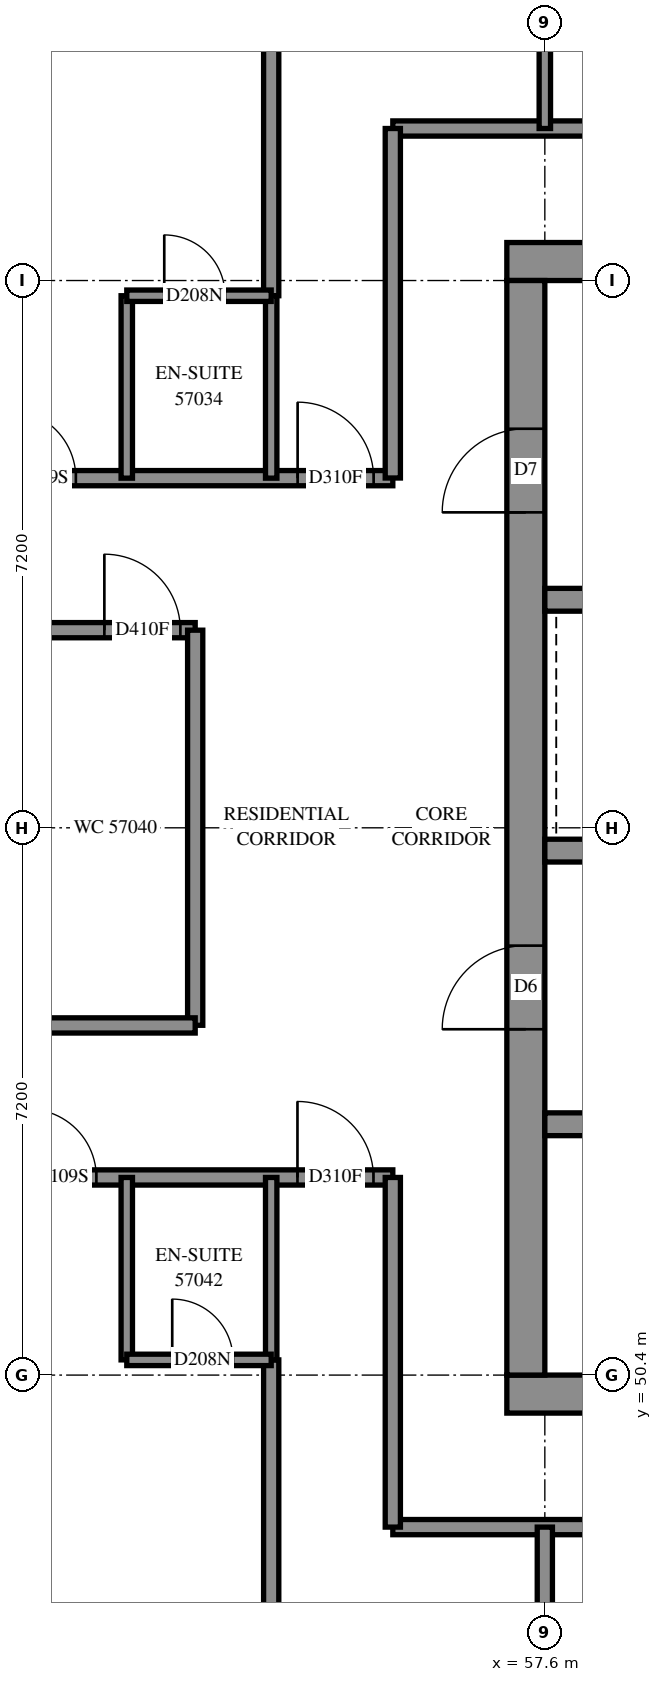
"""IFC4 building model, lengths in metres.
Left out: names, types, materials, properties, quantities, classifications, styles, units other than length and angle.
Written with IfcOpenShell. Run it as: python <this file> out.ifc"""

import sys

from ifc_helpers import new_model, si_unit, direction, frame, frame_2d, origin, place, context, subcontext, project, spatial, rectangle, extrude, element, fill, save


model = new_model("IFC4")
c1 = context("Model", 3, precision=1e-05, world=origin(), true_north=direction((0.0, 1.0)))
c2 = subcontext(c1, "Body", "Model", "MODEL_VIEW")
j1 = project(units=[si_unit("LENGTHUNIT", "METRE"), si_unit("PLANEANGLEUNIT", "RADIAN")], contexts=[c1])
p1 = place(None, origin())
s1 = spatial("IfcSite", under=j1, at=p1, CompositionType="ELEMENT")
p2 = place(p1, origin())
s2 = spatial("IfcBuilding", under=s1, at=p2, CompositionType="ELEMENT")
p3 = place(p2, frame((0.0, 0.0, 210.0)))
s3 = spatial("IfcBuildingStorey", under=s2, at=p3, CompositionType="ELEMENT", Elevation=210.0)
p4 = place(p3, frame((57.1, 50.15, -0.3), z_axis=(0.0, 0.0, 1.0), x_axis=(1.0, 0.0, 0.0)))
e1 = element("IfcWall", 1, at=p4, inside=s3, PredefinedType="SHEAR", context=c2, shape_type="SweptSolid", body=[
    extrude(rectangle(XDim=15.4, YDim=0.5, at=frame_2d((7.7, 0.0))), origin(), (0.0, 0.0, 1.0), 2.7),
])
p5 = place(p3, frame((57.1, 65.05, -0.3), z_axis=(0.0, 0.0, 1.0), x_axis=(1.0, 0.0, 0.0)))
e2 = element("IfcWall", 2, at=p5, inside=s3, PredefinedType="SHEAR", context=c2, shape_type="SweptSolid", body=[
    extrude(rectangle(XDim=15.4, YDim=0.5, at=frame_2d((7.7, 0.0))), origin(), (0.0, 0.0, 1.0), 2.7),
])
p6 = place(p5, frame((10.5, 0.0, 0.3)))
e3 = element("IfcOpeningElement", 3, at=p6, cuts=e2, PredefinedType="OPENING", context=c2, shape_type="SweptSolid", body=[
    extrude(rectangle(XDim=0.8, YDim=2.1, at=frame_2d((0.4, 1.05))), frame((0.0, 0.26, 0.0), z_axis=(0.0, -1.0, 0.0), x_axis=(1.0, 0.0, 0.0)), (0.0, 0.0, 1.0), 0.52),
])
p7 = place(p3, frame((57.35, 50.4, -0.3), z_axis=(0.0, 0.0, 1.0), x_axis=(0.0, 1.0, 0.0)))
e4 = element("IfcWall", 4, at=p7, inside=s3, PredefinedType="SHEAR", context=c2, shape_type="SweptSolid", body=[
    extrude(rectangle(XDim=14.4, YDim=0.5, at=frame_2d((7.2, 0.0))), origin(), (0.0, 0.0, 1.0), 2.7),
])
p8 = place(p7, frame((4.55, 0.0, 0.3)))
e5 = element("IfcOpeningElement", 5, at=p8, cuts=e4, PredefinedType="OPENING", context=c2, shape_type="SweptSolid", body=[
    extrude(rectangle(XDim=1.1, YDim=2.1, at=frame_2d((0.55, 1.05))), frame((0.0, 0.26, 0.0), z_axis=(0.0, -1.0, 0.0), x_axis=(1.0, 0.0, 0.0)), (0.0, 0.0, 1.0), 0.52),
])
p9 = place(p7, frame((11.35, 0.0, 0.3)))
e6 = element("IfcOpeningElement", 6, at=p9, cuts=e4, PredefinedType="OPENING", context=c2, shape_type="SweptSolid", body=[
    extrude(rectangle(XDim=1.1, YDim=2.1, at=frame_2d((0.55, 1.05))), frame((0.0, 0.26, 0.0), z_axis=(0.0, -1.0, 0.0), x_axis=(1.0, 0.0, 0.0)), (0.0, 0.0, 1.0), 0.52),
])
p10 = place(p3, frame((57.6, 53.7, 0.0), z_axis=(0.0, 0.0, 1.0), x_axis=(1.0, 0.0, 0.0)))
e7 = element("IfcWall", 7, at=p10, inside=s3, PredefinedType="SOLIDWALL", context=c2, shape_type="SweptSolid", body=[
    extrude(rectangle(XDim=14.4, YDim=0.3, at=frame_2d((7.2, 0.0))), origin(), (0.0, 0.0, 1.0), 3.1),
])
p11 = place(p10, frame((1.35, 0.0, 0.0)))
e8 = element("IfcOpeningElement", 8, at=p11, cuts=e7, PredefinedType="OPENING", context=c2, shape_type="SweptSolid", body=[
    extrude(rectangle(XDim=0.9, YDim=2.1, at=frame_2d((0.45, 1.05))), frame((0.0, 0.16, 0.0), z_axis=(0.0, -1.0, 0.0), x_axis=(1.0, 0.0, 0.0)), (0.0, 0.0, 1.0), 0.32),
])
p12 = place(p10, frame((4.95, 0.0, 0.0)))
e9 = element("IfcOpeningElement", 9, at=p12, cuts=e7, PredefinedType="OPENING", context=c2, shape_type="SweptSolid", body=[
    extrude(rectangle(XDim=0.9, YDim=2.1, at=frame_2d((0.45, 1.05))), frame((0.0, 0.16, 0.0), z_axis=(0.0, -1.0, 0.0), x_axis=(1.0, 0.0, 0.0)), (0.0, 0.0, 1.0), 0.32),
])
p13 = place(p10, frame((8.55, 0.0, 0.0)))
e10 = element("IfcOpeningElement", 10, at=p13, cuts=e7, PredefinedType="OPENING", context=c2, shape_type="SweptSolid", body=[
    extrude(rectangle(XDim=0.9, YDim=2.1, at=frame_2d((0.45, 1.05))), frame((0.0, 0.16, 0.0), z_axis=(0.0, -1.0, 0.0), x_axis=(1.0, 0.0, 0.0)), (0.0, 0.0, 1.0), 0.32),
])
p14 = place(p10, frame((12.05, 0.0, 0.0)))
e11 = element("IfcOpeningElement", 11, at=p14, cuts=e7, PredefinedType="OPENING", context=c2, shape_type="SweptSolid", body=[
    extrude(rectangle(XDim=1.1, YDim=2.1, at=frame_2d((0.55, 1.05))), frame((0.0, 0.16, 0.0), z_axis=(0.0, -1.0, 0.0), x_axis=(1.0, 0.0, 0.0)), (0.0, 0.0, 1.0), 0.32),
])
p15 = place(p3, frame((57.6, 57.3, 0.0), z_axis=(0.0, 0.0, 1.0), x_axis=(1.0, 0.0, 0.0)))
e12 = element("IfcWall", 12, at=p15, inside=s3, PredefinedType="SOLIDWALL", context=c2, shape_type="SweptSolid", body=[
    extrude(rectangle(XDim=14.4, YDim=0.3, at=frame_2d((7.2, 0.0))), origin(), (0.0, 0.0, 1.0), 3.1),
])
p16 = place(p15, frame((1.25, 0.0, 0.0)))
e13 = element("IfcOpeningElement", 13, at=p16, cuts=e12, PredefinedType="OPENING", context=c2, shape_type="SweptSolid", body=[
    extrude(rectangle(XDim=1.1, YDim=2.1, at=frame_2d((0.55, 1.05))), frame((0.0, 0.16, 0.0), z_axis=(0.0, -1.0, 0.0), x_axis=(1.0, 0.0, 0.0)), (0.0, 0.0, 1.0), 0.32),
])
p17 = place(p15, frame((4.85, 0.0, 0.0)))
e14 = element("IfcOpeningElement", 14, at=p17, cuts=e12, PredefinedType="OPENING", context=c2, shape_type="SweptSolid", body=[
    extrude(rectangle(XDim=1.1, YDim=2.1, at=frame_2d((0.55, 1.05))), frame((0.0, 0.16, 0.0), z_axis=(0.0, -1.0, 0.0), x_axis=(1.0, 0.0, 0.0)), (0.0, 0.0, 1.0), 0.32),
])
p18 = place(p15, frame((8.45, 0.0, 0.0)))
e15 = element("IfcOpeningElement", 15, at=p18, cuts=e12, PredefinedType="OPENING", context=c2, shape_type="SweptSolid", body=[
    extrude(rectangle(XDim=1.1, YDim=2.1, at=frame_2d((0.55, 1.05))), frame((0.0, 0.16, 0.0), z_axis=(0.0, -1.0, 0.0), x_axis=(1.0, 0.0, 0.0)), (0.0, 0.0, 1.0), 0.32),
])
p19 = place(p15, frame((12.05, 0.0, 0.0)))
e16 = element("IfcOpeningElement", 16, at=p19, cuts=e12, PredefinedType="OPENING", context=c2, shape_type="SweptSolid", body=[
    extrude(rectangle(XDim=1.1, YDim=2.1, at=frame_2d((0.55, 1.05))), frame((0.0, 0.16, 0.0), z_axis=(0.0, -1.0, 0.0), x_axis=(1.0, 0.0, 0.0)), (0.0, 0.0, 1.0), 0.32),
])
p20 = place(p3, frame((57.6, 60.6, 0.0), z_axis=(0.0, 0.0, 1.0), x_axis=(1.0, 0.0, 0.0)))
e17 = element("IfcWall", 17, at=p20, inside=s3, PredefinedType="SOLIDWALL", context=c2, shape_type="SweptSolid", body=[
    extrude(rectangle(XDim=7.2, YDim=0.3, at=frame_2d((3.6, 0.0))), origin(), (0.0, 0.0, 1.0), 3.1),
])
p21 = place(p3, frame((55.6, 48.4, 0.0), z_axis=(0.0, 0.0, 1.0), x_axis=(1.0, 0.0, 0.0)))
e18 = element("IfcWall", 18, at=p21, inside=s3, PredefinedType="PARTITIONING", context=c2, shape_type="SweptSolid", body=[
    extrude(rectangle(XDim=18.4, YDim=0.2, at=frame_2d((9.2, 0.0))), origin(), (0.0, 0.0, 1.0), 3.1),
])
p22 = place(p21, frame((5.862, 0.0, 0.0)))
e19 = element("IfcOpeningElement", 19, at=p22, cuts=e18, PredefinedType="OPENING", context=c2, shape_type="SweptSolid", body=[
    extrude(rectangle(XDim=1.0, YDim=2.1, at=frame_2d((0.5, 1.05))), frame((0.0, 0.11, 0.0), z_axis=(0.0, -1.0, 0.0), x_axis=(1.0, 0.0, 0.0)), (0.0, 0.0, 1.0), 0.22),
])
p23 = place(p21, frame((13.099, 0.0, 0.0)))
e20 = element("IfcOpeningElement", 20, at=p23, cuts=e18, PredefinedType="OPENING", context=c2, shape_type="SweptSolid", body=[
    extrude(rectangle(XDim=0.9, YDim=2.1, at=frame_2d((0.45, 1.05))), frame((0.0, 0.11, 0.0), z_axis=(0.0, -1.0, 0.0), x_axis=(1.0, 0.0, 0.0)), (0.0, 0.0, 1.0), 0.22),
])
p24 = place(p3, frame((55.6, 66.8, 0.0), z_axis=(0.0, 0.0, 1.0), x_axis=(1.0, 0.0, 0.0)))
e21 = element("IfcWall", 21, at=p24, inside=s3, PredefinedType="PARTITIONING", context=c2, shape_type="SweptSolid", body=[
    extrude(rectangle(XDim=18.4, YDim=0.2, at=frame_2d((9.2, 0.0))), origin(), (0.0, 0.0, 1.0), 3.1),
])
p25 = place(p24, frame((4.25, 0.0, 0.0)))
e22 = element("IfcOpeningElement", 22, at=p25, cuts=e21, PredefinedType="OPENING", context=c2, shape_type="SweptSolid", body=[
    extrude(rectangle(XDim=0.9, YDim=2.1, at=frame_2d((0.45, 1.05))), frame((0.0, 0.11, 0.0), z_axis=(0.0, -1.0, 0.0), x_axis=(1.0, 0.0, 0.0)), (0.0, 0.0, 1.0), 0.22),
])
p26 = place(p24, frame((7.974, 0.0, 0.0)))
e23 = element("IfcOpeningElement", 23, at=p26, cuts=e21, PredefinedType="OPENING", context=c2, shape_type="SweptSolid", body=[
    extrude(rectangle(XDim=1.0, YDim=2.1, at=frame_2d((0.5, 1.05))), frame((0.0, 0.11, 0.0), z_axis=(0.0, -1.0, 0.0), x_axis=(1.0, 0.0, 0.0)), (0.0, 0.0, 1.0), 0.22),
])
p27 = place(p24, frame((13.2, 0.0, 0.0)))
e24 = element("IfcOpeningElement", 24, at=p27, cuts=e21, PredefinedType="OPENING", context=c2, shape_type="SweptSolid", body=[
    extrude(rectangle(XDim=0.9, YDim=2.1, at=frame_2d((0.45, 1.05))), frame((0.0, 0.11, 0.0), z_axis=(0.0, -1.0, 0.0), x_axis=(1.0, 0.0, 0.0)), (0.0, 0.0, 1.0), 0.22),
])
p28 = place(p3, frame((36.0, 60.2, 0.0), z_axis=(0.0, 0.0, 1.0), x_axis=(1.0, 0.0, 0.0)))
e25 = element("IfcWall", 25, at=p28, inside=s3, PredefinedType="PARTITIONING", context=c2, shape_type="SweptSolid", body=[
    extrude(rectangle(XDim=17.0, YDim=0.2, at=frame_2d((8.5, 0.0))), origin(), (0.0, 0.0, 1.0), 3.1),
])
p29 = place(p28, frame((4.125, 0.0, 0.0)))
e26 = element("IfcOpeningElement", 26, at=p29, cuts=e25, PredefinedType="OPENING", context=c2, shape_type="SweptSolid", body=[
    extrude(rectangle(XDim=1.0, YDim=2.1, at=frame_2d((0.5, 1.05))), frame((0.0, 0.11, 0.0), z_axis=(0.0, -1.0, 0.0), x_axis=(1.0, 0.0, 0.0)), (0.0, 0.0, 1.0), 0.22),
])
p30 = place(p28, frame((7.6, 0.0, 0.0)))
e27 = element("IfcOpeningElement", 27, at=p30, cuts=e25, PredefinedType="OPENING", context=c2, shape_type="SweptSolid", body=[
    extrude(rectangle(XDim=0.9, YDim=2.1, at=frame_2d((0.45, 1.05))), frame((0.0, 0.11, 0.0), z_axis=(0.0, -1.0, 0.0), x_axis=(1.0, 0.0, 0.0)), (0.0, 0.0, 1.0), 0.22),
])
p31 = place(p28, frame((11.48, 0.0, 0.0)))
e28 = element("IfcOpeningElement", 28, at=p31, cuts=e25, PredefinedType="OPENING", context=c2, shape_type="SweptSolid", body=[
    extrude(rectangle(XDim=1.0, YDim=2.1, at=frame_2d((0.5, 1.05))), frame((0.0, 0.11, 0.0), z_axis=(0.0, -1.0, 0.0), x_axis=(1.0, 0.0, 0.0)), (0.0, 0.0, 1.0), 0.22),
])
p32 = place(p28, frame((15.805, 0.0, 0.0)))
e29 = element("IfcOpeningElement", 29, at=p32, cuts=e25, PredefinedType="OPENING", context=c2, shape_type="SweptSolid", body=[
    extrude(rectangle(XDim=1.0, YDim=2.1, at=frame_2d((0.5, 1.05))), frame((0.0, 0.11, 0.0), z_axis=(0.0, -1.0, 0.0), x_axis=(1.0, 0.0, 0.0)), (0.0, 0.0, 1.0), 0.22),
])
p33 = place(p3, frame((40.602, 62.2, 0.0), z_axis=(0.0, 0.0, 1.0), x_axis=(1.0, 0.0, 0.0)))
e30 = element("IfcWall", 30, at=p33, inside=s3, PredefinedType="PARTITIONING", context=c2, shape_type="SweptSolid", body=[
    extrude(rectangle(XDim=14.998, YDim=0.2, at=frame_2d((7.499, 0.0))), origin(), (0.0, 0.0, 1.0), 3.1),
])
p34 = place(p33, frame((6.308, 0.0, 0.0)))
e31 = element("IfcOpeningElement", 31, at=p34, cuts=e30, PredefinedType="OPENING", context=c2, shape_type="SweptSolid", body=[
    extrude(rectangle(XDim=1.0, YDim=2.1, at=frame_2d((0.5, 1.05))), frame((0.0, 0.11, 0.0), z_axis=(0.0, -1.0, 0.0), x_axis=(1.0, 0.0, 0.0)), (0.0, 0.0, 1.0), 0.22),
])
p35 = place(p33, frame((9.928, 0.0, 0.0)))
e32 = element("IfcOpeningElement", 32, at=p35, cuts=e30, PredefinedType="OPENING", context=c2, shape_type="SweptSolid", body=[
    extrude(rectangle(XDim=0.9, YDim=2.1, at=frame_2d((0.45, 1.05))), frame((0.0, 0.11, 0.0), z_axis=(0.0, -1.0, 0.0), x_axis=(1.0, 0.0, 0.0)), (0.0, 0.0, 1.0), 0.22),
])
p36 = place(p33, frame((13.746, 0.0, 0.0)))
e33 = element("IfcOpeningElement", 33, at=p36, cuts=e30, PredefinedType="OPENING", context=c2, shape_type="SweptSolid", body=[
    extrude(rectangle(XDim=1.0, YDim=2.1, at=frame_2d((0.5, 1.05))), frame((0.0, 0.11, 0.0), z_axis=(0.0, -1.0, 0.0), x_axis=(1.0, 0.0, 0.0)), (0.0, 0.0, 1.0), 0.22),
])
p37 = place(p3, frame((54.0, 42.345, 0.0), z_axis=(0.0, 0.0, 1.0), x_axis=(0.0, 1.0, 0.0)))
e34 = element("IfcWall", 34, at=p37, inside=s3, PredefinedType="PARTITIONING", context=c2, shape_type="SweptSolid", body=[
    extrude(rectangle(XDim=8.255, YDim=0.2, at=frame_2d((4.128, 0.0))), origin(), (0.0, 0.0, 1.0), 3.1),
])
p38 = place(p3, frame((54.0, 64.6, 0.0), z_axis=(0.0, 0.0, 1.0), x_axis=(0.0, 1.0, 0.0)))
e35 = element("IfcWall", 35, at=p38, inside=s3, PredefinedType="PARTITIONING", context=c2, shape_type="SweptSolid", body=[
    extrude(rectangle(XDim=8.18, YDim=0.2, at=frame_2d((4.09, 0.0))), origin(), (0.0, 0.0, 1.0), 3.1),
])
p39 = place(p3, frame((50.4, 53.0, 0.0), z_axis=(0.0, 0.0, 1.0), x_axis=(1.0, 0.0, 0.0)))
e36 = element("IfcWall", 36, at=p39, inside=s3, PredefinedType="PARTITIONING", context=c2, shape_type="SweptSolid", body=[
    extrude(rectangle(XDim=5.2, YDim=0.2, at=frame_2d((2.6, 0.0))), origin(), (0.0, 0.0, 1.0), 3.1),
])
p40 = place(p39, frame((0.4, 0.0, 0.0)))
e37 = element("IfcOpeningElement", 37, at=p40, cuts=e36, PredefinedType="OPENING", context=c2, shape_type="SweptSolid", body=[
    extrude(rectangle(XDim=0.9, YDim=2.1, at=frame_2d((0.45, 1.05))), frame((0.0, 0.11, 0.0), z_axis=(0.0, -1.0, 0.0), x_axis=(1.0, 0.0, 0.0)), (0.0, 0.0, 1.0), 0.22),
])
p41 = place(p39, frame((3.946, 0.0, 0.0)))
e38 = element("IfcOpeningElement", 38, at=p41, cuts=e36, PredefinedType="OPENING", context=c2, shape_type="SweptSolid", body=[
    extrude(rectangle(XDim=1.0, YDim=2.1, at=frame_2d((0.5, 1.05))), frame((0.0, 0.11, 0.0), z_axis=(0.0, -1.0, 0.0), x_axis=(1.0, 0.0, 0.0)), (0.0, 0.0, 1.0), 0.22),
])
p42 = place(p3, frame((53.0, 55.002, 0.0), z_axis=(0.0, 0.0, 1.0), x_axis=(0.0, 1.0, 0.0)))
e39 = element("IfcWall", 39, at=p42, inside=s3, PredefinedType="PARTITIONING", context=c2, shape_type="SweptSolid", body=[
    extrude(rectangle(XDim=5.198, YDim=0.2, at=frame_2d((2.599, 0.0))), origin(), (0.0, 0.0, 1.0), 3.1),
])
p43 = place(p3, frame((57.6, 43.6, 0.0), z_axis=(0.0, 0.0, 1.0), x_axis=(0.0, 1.0, 0.0)))
e40 = element("IfcWall", 40, at=p43, inside=s3, PredefinedType="PARTITIONING", context=c2, shape_type="SweptSolid", body=[
    extrude(rectangle(XDim=4.8, YDim=0.2, at=frame_2d((2.4, 0.0))), origin(), (0.0, 0.0, 1.0), 3.1),
])
p44 = place(p3, frame((55.6, 48.4, 0.0), z_axis=(0.0, 0.0, 1.0), x_axis=(0.0, 1.0, 0.0)))
e41 = element("IfcWall", 41, at=p44, inside=s3, PredefinedType="PARTITIONING", context=c2, shape_type="SweptSolid", body=[
    extrude(rectangle(XDim=4.6, YDim=0.2, at=frame_2d((2.3, 0.0))), origin(), (0.0, 0.0, 1.0), 3.1),
])
p45 = place(p3, frame((55.6, 62.202, 0.0), z_axis=(0.0, 0.0, 1.0), x_axis=(0.0, 1.0, 0.0)))
e42 = element("IfcWall", 42, at=p45, inside=s3, PredefinedType="PARTITIONING", context=c2, shape_type="SweptSolid", body=[
    extrude(rectangle(XDim=4.598, YDim=0.2, at=frame_2d((2.299, 0.0))), origin(), (0.0, 0.0, 1.0), 3.1),
])
p46 = place(p3, frame((50.4, 55.0, 0.0), z_axis=(0.0, 0.0, 1.0), x_axis=(1.0, 0.0, 0.0)))
e43 = element("IfcWall", 43, at=p46, inside=s3, PredefinedType="PARTITIONING", context=c2, shape_type="SweptSolid", body=[
    extrude(rectangle(XDim=2.6, YDim=0.2, at=frame_2d((1.3, 0.0))), origin(), (0.0, 0.0, 1.0), 3.1),
])
for number, where, z_axis, x_axis in (
    (44, (57.6, 66.8, 0.0), (0.0, 0.0, 1.0), (0.0, 1.0, 0.0)),
    (45, (52.1, 50.6, 0.0), (0.0, 0.0, 1.0), (0.0, 1.0, 0.0)),
    (46, (54.0, 50.6, 0.0), (0.0, 0.0, 1.0), (0.0, 1.0, 0.0)),
    (47, (52.1, 62.2, 0.0), (0.0, 0.0, 1.0), (0.0, 1.0, 0.0)),
    (48, (54.0, 62.2, 0.0), (0.0, 0.0, 1.0), (0.0, 1.0, 0.0)),
):
    element("IfcWall", number, at=place(p3, frame(where, z_axis=z_axis, x_axis=x_axis)), inside=s3, PredefinedType="PARTITIONING", context=c2, shape_type="SweptSolid", body=[
        extrude(rectangle(XDim=2.4, YDim=0.15, at=frame_2d((1.2, 0.0))), origin(), (0.0, 0.0, 1.0), 3.1),
    ])
p47 = place(p3, frame((52.1, 64.6, 0.0), z_axis=(0.0, 0.0, 1.0), x_axis=(1.0, 0.0, 0.0)))
e49 = element("IfcWall", 49, at=p47, inside=s3, PredefinedType="PARTITIONING", context=c2, shape_type="SweptSolid", body=[
    extrude(rectangle(XDim=1.9, YDim=0.15, at=frame_2d((0.95, 0.0))), origin(), (0.0, 0.0, 1.0), 3.1),
])
p48 = place(p47, frame((0.493, 0.0, 0.0)))
e50 = element("IfcOpeningElement", 50, at=p48, cuts=e49, PredefinedType="OPENING", context=c2, shape_type="SweptSolid", body=[
    extrude(rectangle(XDim=0.8, YDim=2.1, at=frame_2d((0.4, 1.05))), frame((0.0, 0.085, 0.0), z_axis=(0.0, -1.0, 0.0), x_axis=(1.0, 0.0, 0.0)), (0.0, 0.0, 1.0), 0.17),
])
p49 = place(p3, frame((52.1, 50.6, 0.0), z_axis=(0.0, 0.0, 1.0), x_axis=(1.0, 0.0, 0.0)))
e51 = element("IfcWall", 51, at=p49, inside=s3, PredefinedType="PARTITIONING", context=c2, shape_type="SweptSolid", body=[
    extrude(rectangle(XDim=1.9, YDim=0.15, at=frame_2d((0.95, 0.0))), origin(), (0.0, 0.0, 1.0), 3.1),
])
p50 = place(p49, frame((0.598, 0.0, 0.0)))
e52 = element("IfcOpeningElement", 52, at=p50, cuts=e51, PredefinedType="OPENING", context=c2, shape_type="SweptSolid", body=[
    extrude(rectangle(XDim=0.8, YDim=2.1, at=frame_2d((0.4, 1.05))), frame((0.0, 0.085, 0.0), z_axis=(0.0, -1.0, 0.0), x_axis=(1.0, 0.0, 0.0)), (0.0, 0.0, 1.0), 0.17),
])
p51 = place(p8, origin())
e53 = element("IfcDoor", 53, at=p51, inside=s3, OperationType="DOUBLE_DOOR_SINGLE_SWING", PredefinedType="DOOR", context=c2, shape_type="SweptSolid", body=[
    extrude(rectangle(XDim=1.1, YDim=2.1, at=frame_2d((0.55, 1.05))), frame((0.0, 0.025, 0.0), z_axis=(0.0, -1.0, 0.0), x_axis=(1.0, 0.0, 0.0)), (0.0, 0.0, 1.0), 0.05),
])
fill(e5, e53)
p52 = place(p9, origin())
e54 = element("IfcDoor", 54, at=p52, inside=s3, OperationType="SINGLE_SWING_LEFT", PredefinedType="DOOR", context=c2, shape_type="SweptSolid", body=[
    extrude(rectangle(XDim=1.1, YDim=2.1, at=frame_2d((0.55, 1.05))), frame((0.0, 0.025, 0.0), z_axis=(0.0, -1.0, 0.0), x_axis=(1.0, 0.0, 0.0)), (0.0, 0.0, 1.0), 0.05),
])
fill(e6, e54)
p53 = place(p35, origin())
e55 = element("IfcDoor", 55, at=p53, inside=s3, OperationType="SINGLE_SWING_RIGHT", PredefinedType="DOOR", context=c2, shape_type="SweptSolid", body=[
    extrude(rectangle(XDim=0.9, YDim=2.1, at=frame_2d((0.45, 1.05))), frame((0.0, 0.025, 0.0), z_axis=(0.0, -1.0, 0.0), x_axis=(1.0, 0.0, 0.0)), (0.0, 0.0, 1.0), 0.05),
])
fill(e32, e55)
p54 = place(p48, origin())
e56 = element("IfcDoor", 56, at=p54, inside=s3, OperationType="SINGLE_SWING_RIGHT", PredefinedType="DOOR", context=c2, shape_type="SweptSolid", body=[
    extrude(rectangle(XDim=0.8, YDim=2.1, at=frame_2d((0.4, 1.05))), frame((0.0, 0.025, 0.0), z_axis=(0.0, -1.0, 0.0), x_axis=(1.0, 0.0, 0.0)), (0.0, 0.0, 1.0), 0.05),
])
fill(e50, e56)
p55 = place(p36, origin())
e57 = element("IfcDoor", 57, at=p55, inside=s3, OperationType="SINGLE_SWING_LEFT", PredefinedType="DOOR", context=c2, shape_type="SweptSolid", body=[
    extrude(rectangle(XDim=1.0, YDim=2.1, at=frame_2d((0.5, 1.05))), frame((0.0, 0.025, 0.0), z_axis=(0.0, -1.0, 0.0), x_axis=(1.0, 0.0, 0.0)), (0.0, 0.0, 1.0), 0.05),
])
fill(e33, e57)
p56 = place(p32, origin())
e58 = element("IfcDoor", 58, at=p56, inside=s3, OperationType="SINGLE_SWING_LEFT", PredefinedType="DOOR", context=c2, shape_type="SweptSolid", body=[
    extrude(rectangle(XDim=1.0, YDim=2.1, at=frame_2d((0.5, 1.05))), frame((0.0, 0.025, 0.0), z_axis=(0.0, -1.0, 0.0), x_axis=(1.0, 0.0, 0.0)), (0.0, 0.0, 1.0), 0.05),
])
fill(e29, e58)
p57 = place(p40, origin())
e59 = element("IfcDoor", 59, at=p57, inside=s3, OperationType="SINGLE_SWING_LEFT", PredefinedType="DOOR", context=c2, shape_type="SweptSolid", body=[
    extrude(rectangle(XDim=0.9, YDim=2.1, at=frame_2d((0.45, 1.05))), frame((0.0, 0.025, 0.0), z_axis=(0.0, -1.0, 0.0), x_axis=(1.0, 0.0, 0.0)), (0.0, 0.0, 1.0), 0.05),
])
fill(e37, e59)
p58 = place(p50, origin())
e60 = element("IfcDoor", 60, at=p58, inside=s3, OperationType="SINGLE_SWING_RIGHT", PredefinedType="DOOR", context=c2, shape_type="SweptSolid", body=[
    extrude(rectangle(XDim=0.8, YDim=2.1, at=frame_2d((0.4, 1.05))), frame((0.0, 0.025, 0.0), z_axis=(0.0, -1.0, 0.0), x_axis=(1.0, 0.0, 0.0)), (0.0, 0.0, 1.0), 0.05),
])
fill(e52, e60)
p59 = place(p41, origin())
e61 = element("IfcDoor", 61, at=p59, inside=s3, OperationType="SINGLE_SWING_RIGHT", PredefinedType="DOOR", context=c2, shape_type="SweptSolid", body=[
    extrude(rectangle(XDim=1.0, YDim=2.1, at=frame_2d((0.5, 1.05))), frame((0.0, 0.025, 0.0), z_axis=(0.0, -1.0, 0.0), x_axis=(1.0, 0.0, 0.0)), (0.0, 0.0, 1.0), 0.05),
])
fill(e38, e61)
save(model, sys.argv[1])
